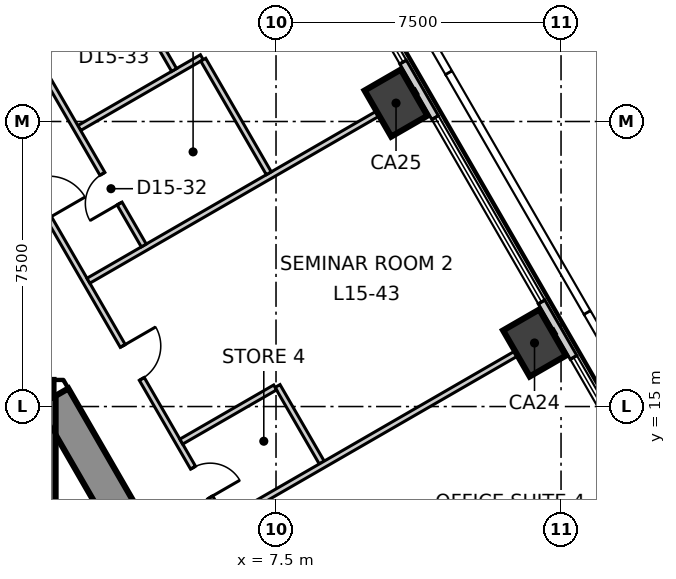
"""IFC4 building model, lengths in metres.
Left out: names, types, materials, properties, quantities, classifications, styles, units other than length and angle.
Written with IfcOpenShell. Run it as: python <this file> out.ifc"""

import sys

from ifc_helpers import new_model, si_unit, direction, frame, frame_2d, origin, origin_2d, place, context, subcontext, project, spatial, polyline, rectangle, outline, extrude, element, fill, save


model = new_model("IFC4")
c1 = context("Model", 3, precision=1e-05, world=origin(), true_north=direction((0.0, 1.0)))
c2 = subcontext(c1, "Body", "Model", "MODEL_VIEW")
j1 = project(units=[si_unit("LENGTHUNIT", "METRE"), si_unit("PLANEANGLEUNIT", "RADIAN")], contexts=[c1])
p1 = place(None, origin())
s1 = spatial("IfcSite", under=j1, at=p1, CompositionType="ELEMENT")
p2 = place(p1, origin())
s2 = spatial("IfcBuilding", under=s1, at=p2, CompositionType="ELEMENT")
p3 = place(p2, frame((0.0, 0.0, 71.3)))
s3 = spatial("IfcBuildingStorey", under=s2, at=p3, CompositionType="ELEMENT", Elevation=71.3)
p4 = place(p3, frame((1.645, 15.25, -0.3), z_axis=(0.0, 0.0, 1.0), x_axis=(-1.0, 0.0, 0.0)))
e1 = element("IfcWall", 1, at=p4, inside=s3, PredefinedType="SHEAR", context=c2, shape_type="SweptSolid", body=[
    extrude(outline(polyline([(-0.26, -0.45), (1.645, -0.45), (3.55, -0.45), (3.031, 0.45), (1.645, 0.45), (0.259, 0.45), (-0.26, -0.45)])), origin(), (0.0, 0.0, 1.0), 4.0),
])
p5 = place(p4, frame((0.945, 0.0, 0.3)))
e2 = element("IfcOpeningElement", 2, at=p5, cuts=e1, PredefinedType="OPENING", context=c2, shape_type="SweptSolid", body=[
    extrude(rectangle(XDim=1.4, YDim=2.1, at=frame_2d((0.7, 1.05))), frame((0.0, 0.46, 0.0), z_axis=(0.0, -1.0, 0.0), x_axis=(1.0, 0.0, 0.0)), (0.0, 0.0, 1.0), 0.92),
])
p6 = place(p3, frame((14.03, -6.2, -0.3), z_axis=(0.0, 0.0, 1.0), x_axis=(-0.500026485275, 0.866010111964, 0.0)))
e3 = element("IfcWall", 3, at=p6, inside=s3, PredefinedType="SHEAR", context=c2, shape_type="SweptSolid", body=[
    extrude(outline(polyline([(-0.26, -0.449), (1.685, -0.449), (3.63, -0.449), (5.576, -0.449), (7.521, -0.449), (9.466, -0.449), (11.411, -0.449), (13.357, -0.449), (15.302, -0.449), (17.247, -0.45), (19.192, -0.45), (21.138, -0.45), (23.083, -0.45), (25.028, -0.45), (24.509, 0.449), (22.644, 0.449), (20.778, 0.449), (18.913, 0.449), (17.048, 0.449), (15.182, 0.449), (13.317, 0.449), (11.452, 0.449), (9.587, 0.449), (7.721, 0.45), (5.856, 0.45), (3.991, 0.45), (2.125, 0.45), (0.26, 0.45), (-0.26, -0.449)])), origin(), (0.0, 0.0, 1.0), 4.0),
])
p7 = place(p6, frame((11.484, 0.0, 0.3)))
e4 = element("IfcOpeningElement", 4, at=p7, cuts=e3, PredefinedType="OPENING", context=c2, shape_type="SweptSolid", body=[
    extrude(rectangle(XDim=1.8, YDim=2.1, at=frame_2d((0.9, 1.05))), frame((0.0, 0.46, 0.0), z_axis=(0.0, -1.0, 0.0), x_axis=(1.0, 0.0, 0.0)), (0.0, 0.0, 1.0), 0.92),
])
p8 = place(p6, frame((4.892, 0.0, 0.3)))
e5 = element("IfcOpeningElement", 5, at=p8, cuts=e3, PredefinedType="OPENING", context=c2, shape_type="SweptSolid", body=[
    extrude(rectangle(XDim=0.9, YDim=2.1, at=frame_2d((0.45, 1.05))), frame((0.0, 0.46, 0.0), z_axis=(0.0, -1.0, 0.0), x_axis=(1.0, 0.0, 0.0)), (0.0, 0.0, 1.0), 0.92),
])
p9 = place(p6, frame((18.976, 0.0, 0.3)))
e6 = element("IfcOpeningElement", 6, at=p9, cuts=e3, PredefinedType="OPENING", context=c2, shape_type="SweptSolid", body=[
    extrude(rectangle(XDim=0.9, YDim=2.1, at=frame_2d((0.45, 1.05))), frame((0.0, 0.46, 0.0), z_axis=(0.0, -1.0, 0.0), x_axis=(1.0, 0.0, 0.0)), (0.0, 0.0, 1.0), 0.92),
])
for number, where, z_axis, x_axis in (
    (7, (14.302, 16.672, -0.3), (0.0, 0.0, 1.0), (-0.5, 0.866, 0.0)),
    (8, (10.658, 22.984, -0.3), (0.0, 0.0, 1.0), (-0.5, 0.866, 0.0)),
):
    element("IfcColumn", number, at=place(p3, frame(where, z_axis=z_axis, x_axis=x_axis)), inside=s3, PredefinedType="COLUMN", context=c2, shape_type="SweptSolid", body=[
        extrude(rectangle(XDim=1.4, YDim=1.1, at=origin_2d()), origin(), (0.0, 0.0, 1.0), 4.0),
    ])
p10 = place(p3, frame((33.779, -15.662, 0.0), z_axis=(0.0, 0.0, 1.0), x_axis=(-0.500000131003, 0.86602532815, 0.0)))
e9 = element("IfcWall", 9, at=p10, inside=s3, PredefinedType="ELEMENTEDWALL", context=c2, shape_type="SweptSolid", body=[
    extrude(rectangle(XDim=60.886, YDim=0.2, at=frame_2d((30.443, 0.0))), origin(), (0.0, 0.0, 1.0), 3.7),
])
p11 = place(p10, frame((2.147, 0.0, 0.9)))
e10 = element("IfcOpeningElement", 10, at=p11, cuts=e9, PredefinedType="OPENING", context=c2, shape_type="SweptSolid", body=[
    extrude(rectangle(XDim=5.6, YDim=2.5, at=frame_2d((2.8, 1.25))), frame((0.0, 0.11, 0.0), z_axis=(0.0, -1.0, 0.0), x_axis=(1.0, 0.0, 0.0)), (0.0, 0.0, 1.0), 0.22),
])
p12 = place(p10, frame((9.434, 0.0, 0.9)))
e11 = element("IfcOpeningElement", 11, at=p12, cuts=e9, PredefinedType="OPENING", context=c2, shape_type="SweptSolid", body=[
    extrude(rectangle(XDim=5.6, YDim=2.5, at=frame_2d((2.8, 1.25))), frame((0.0, 0.11, 0.0), z_axis=(0.0, -1.0, 0.0), x_axis=(1.0, 0.0, 0.0)), (0.0, 0.0, 1.0), 0.22),
])
p13 = place(p10, frame((16.722, 0.0, 0.9)))
e12 = element("IfcOpeningElement", 12, at=p13, cuts=e9, PredefinedType="OPENING", context=c2, shape_type="SweptSolid", body=[
    extrude(rectangle(XDim=5.6, YDim=2.5, at=frame_2d((2.8, 1.25))), frame((0.0, 0.11, 0.0), z_axis=(0.0, -1.0, 0.0), x_axis=(1.0, 0.0, 0.0)), (0.0, 0.0, 1.0), 0.22),
])
p14 = place(p10, frame((24.009, 0.0, 0.9)))
e13 = element("IfcOpeningElement", 13, at=p14, cuts=e9, PredefinedType="OPENING", context=c2, shape_type="SweptSolid", body=[
    extrude(rectangle(XDim=5.6, YDim=2.5, at=frame_2d((2.8, 1.25))), frame((0.0, 0.11, 0.0), z_axis=(0.0, -1.0, 0.0), x_axis=(1.0, 0.0, 0.0)), (0.0, 0.0, 1.0), 0.22),
])
p15 = place(p10, frame((31.297, 0.0, 0.9)))
e14 = element("IfcOpeningElement", 14, at=p15, cuts=e9, PredefinedType="OPENING", context=c2, shape_type="SweptSolid", body=[
    extrude(rectangle(XDim=5.6, YDim=2.5, at=frame_2d((2.8, 1.25))), frame((0.0, 0.11, 0.0), z_axis=(0.0, -1.0, 0.0), x_axis=(1.0, 0.0, 0.0)), (0.0, 0.0, 1.0), 0.22),
])
p16 = place(p10, frame((38.584, 0.0, 0.9)))
e15 = element("IfcOpeningElement", 15, at=p16, cuts=e9, PredefinedType="OPENING", context=c2, shape_type="SweptSolid", body=[
    extrude(rectangle(XDim=5.6, YDim=2.5, at=frame_2d((2.8, 1.25))), frame((0.0, 0.11, 0.0), z_axis=(0.0, -1.0, 0.0), x_axis=(1.0, 0.0, 0.0)), (0.0, 0.0, 1.0), 0.22),
])
p17 = place(p10, frame((45.872, 0.0, 0.9)))
e16 = element("IfcOpeningElement", 16, at=p17, cuts=e9, PredefinedType="OPENING", context=c2, shape_type="SweptSolid", body=[
    extrude(rectangle(XDim=5.6, YDim=2.5, at=frame_2d((2.8, 1.25))), frame((0.0, 0.11, 0.0), z_axis=(0.0, -1.0, 0.0), x_axis=(1.0, 0.0, 0.0)), (0.0, 0.0, 1.0), 0.22),
])
p18 = place(p10, frame((53.16, 0.0, 0.9)))
e17 = element("IfcOpeningElement", 17, at=p18, cuts=e9, PredefinedType="OPENING", context=c2, shape_type="SweptSolid", body=[
    extrude(rectangle(XDim=5.6, YDim=2.5, at=frame_2d((2.8, 1.25))), frame((0.0, 0.11, 0.0), z_axis=(0.0, -1.0, 0.0), x_axis=(1.0, 0.0, 0.0)), (0.0, 0.0, 1.0), 0.22),
])
p19 = place(p3, frame((0.075, 22.47, 0.0), z_axis=(0.0, 0.0, 1.0), x_axis=(0.500002280369, -0.866024087209, 0.0)))
e18 = element("IfcWall", 18, at=p19, inside=s3, PredefinedType="PARTITIONING", context=c2, shape_type="SweptSolid", body=[
    extrude(rectangle(XDim=38.844, YDim=0.15, at=frame_2d((19.422, 0.0))), origin(), (0.0, 0.0, 1.0), 3.7),
])
p20 = place(p19, frame((35.944, 0.0, 0.0)))
e19 = element("IfcOpeningElement", 19, at=p20, cuts=e18, PredefinedType="OPENING", context=c2, shape_type="SweptSolid", body=[
    extrude(rectangle(XDim=1.1, YDim=2.1, at=frame_2d((0.55, 1.05))), frame((0.0, 0.085, 0.0), z_axis=(0.0, -1.0, 0.0), x_axis=(1.0, 0.0, 0.0)), (0.0, 0.0, 1.0), 0.17),
])
p21 = place(p19, frame((29.848, 0.0, 0.0)))
e20 = element("IfcOpeningElement", 20, at=p21, cuts=e18, PredefinedType="OPENING", context=c2, shape_type="SweptSolid", body=[
    extrude(rectangle(XDim=1.0, YDim=2.1, at=frame_2d((0.5, 1.05))), frame((0.0, 0.085, 0.0), z_axis=(0.0, -1.0, 0.0), x_axis=(1.0, 0.0, 0.0)), (0.0, 0.0, 1.0), 0.17),
])
p22 = place(p19, frame((14.46, 0.0, 0.0)))
e21 = element("IfcOpeningElement", 21, at=p22, cuts=e18, PredefinedType="OPENING", context=c2, shape_type="SweptSolid", body=[
    extrude(rectangle(XDim=1.1, YDim=2.1, at=frame_2d((0.55, 1.05))), frame((0.0, 0.085, 0.0), z_axis=(0.0, -1.0, 0.0), x_axis=(1.0, 0.0, 0.0)), (0.0, 0.0, 1.0), 0.17),
])
p23 = place(p19, frame((24.66, 0.0, 0.0)))
e22 = element("IfcOpeningElement", 22, at=p23, cuts=e18, PredefinedType="OPENING", context=c2, shape_type="SweptSolid", body=[
    extrude(rectangle(XDim=0.9, YDim=2.1, at=frame_2d((0.45, 1.05))), frame((0.0, 0.085, 0.0), z_axis=(0.0, -1.0, 0.0), x_axis=(1.0, 0.0, 0.0)), (0.0, 0.0, 1.0), 0.17),
])
p24 = place(p19, frame((21.46, 0.0, 0.0)))
e23 = element("IfcOpeningElement", 23, at=p24, cuts=e18, PredefinedType="OPENING", context=c2, shape_type="SweptSolid", body=[
    extrude(rectangle(XDim=0.9, YDim=2.1, at=frame_2d((0.45, 1.05))), frame((0.0, 0.085, 0.0), z_axis=(0.0, -1.0, 0.0), x_axis=(1.0, 0.0, 0.0)), (0.0, 0.0, 1.0), 0.17),
])
p25 = place(p19, frame((18.66, 0.0, 0.0)))
e24 = element("IfcOpeningElement", 24, at=p25, cuts=e18, PredefinedType="OPENING", context=c2, shape_type="SweptSolid", body=[
    extrude(rectangle(XDim=1.0, YDim=2.1, at=frame_2d((0.5, 1.05))), frame((0.0, 0.085, 0.0), z_axis=(0.0, -1.0, 0.0), x_axis=(1.0, 0.0, 0.0)), (0.0, 0.0, 1.0), 0.17),
])
p26 = place(p19, frame((6.785, 0.0, 0.0)))
e25 = element("IfcOpeningElement", 25, at=p26, cuts=e18, PredefinedType="OPENING", context=c2, shape_type="SweptSolid", body=[
    extrude(rectangle(XDim=1.0, YDim=2.1, at=frame_2d((0.5, 1.05))), frame((0.0, 0.085, 0.0), z_axis=(0.0, -1.0, 0.0), x_axis=(1.0, 0.0, 0.0)), (0.0, 0.0, 1.0), 0.17),
])
p27 = place(p19, frame((10.485, 0.0, 0.0)))
e26 = element("IfcOpeningElement", 26, at=p27, cuts=e18, PredefinedType="OPENING", context=c2, shape_type="SweptSolid", body=[
    extrude(rectangle(XDim=0.9, YDim=2.1, at=frame_2d((0.45, 1.05))), frame((0.0, 0.085, 0.0), z_axis=(0.0, -1.0, 0.0), x_axis=(1.0, 0.0, 0.0)), (0.0, 0.0, 1.0), 0.17),
])
p28 = place(p19, frame((1.796, 0.0, 0.0)))
e27 = element("IfcOpeningElement", 27, at=p28, cuts=e18, PredefinedType="OPENING", context=c2, shape_type="SweptSolid", body=[
    extrude(rectangle(XDim=1.1, YDim=2.1, at=frame_2d((0.55, 1.05))), frame((0.0, 0.085, 0.0), z_axis=(0.0, -1.0, 0.0), x_axis=(1.0, 0.0, 0.0)), (0.0, 0.0, 1.0), 0.17),
])
p29 = place(p3, frame((2.563, 18.31, 0.0), z_axis=(0.0, 0.0, 1.0), x_axis=(0.866018758693, 0.500011509459, 0.0)))
e28 = element("IfcWall", 28, at=p29, inside=s3, PredefinedType="PARTITIONING", context=c2, shape_type="SweptSolid", body=[
    extrude(rectangle(XDim=9.968, YDim=0.15, at=frame_2d((4.984, 0.0))), origin(), (0.0, 0.0, 1.0), 3.7),
])
p30 = place(p3, frame((7.54, 15.54, 0.0), z_axis=(0.0, 0.0, 1.0), x_axis=(0.499988999718, -0.866031754707, 0.0)))
e29 = element("IfcWall", 29, at=p30, inside=s3, PredefinedType="PARTITIONING", context=c2, shape_type="SweptSolid", body=[
    extrude(rectangle(XDim=2.326, YDim=0.15, at=frame_2d((1.163, 0.0))), origin(), (0.0, 0.0, 1.0), 3.7),
])
p31 = place(p3, frame((5.007, 14.077, 0.0), z_axis=(0.0, 0.0, 1.0), x_axis=(0.866090043625, 0.499888023795, 0.0)))
e30 = element("IfcWall", 30, at=p31, inside=s3, PredefinedType="PARTITIONING", context=c2, shape_type="SweptSolid", body=[
    extrude(rectangle(XDim=2.851, YDim=0.15, at=frame_2d((1.425, 0.0))), origin(), (0.0, 0.0, 1.0), 3.7),
])
p32 = place(p3, frame((6.207, 11.999, 0.0), z_axis=(0.0, 0.0, 1.0), x_axis=(0.866061182393, 0.499938024511, 0.0)))
e31 = element("IfcWall", 31, at=p32, inside=s3, PredefinedType="PARTITIONING", context=c2, shape_type="SweptSolid", body=[
    extrude(rectangle(XDim=9.967, YDim=0.15, at=frame_2d((4.983, 0.0))), origin(), (0.0, 0.0, 1.0), 3.7),
])
p33 = place(p3, frame((2.322, 22.328, 0.0), z_axis=(0.0, 0.0, 1.0), x_axis=(0.865971665278, 0.500093066274, 0.0)))
e32 = element("IfcWall", 32, at=p33, inside=s3, PredefinedType="PARTITIONING", context=c2, shape_type="SweptSolid", body=[
    extrude(rectangle(XDim=3.725, YDim=0.15, at=frame_2d((1.863, 0.0))), origin(), (0.0, 0.0, 1.0), 3.7),
])
p34 = place(p3, frame((3.755, 25.696, 0.0), z_axis=(0.0, 0.0, 1.0), x_axis=(0.500302479123, -0.865850696935, 0.0)))
e33 = element("IfcWall", 33, at=p34, inside=s3, PredefinedType="PARTITIONING", context=c2, shape_type="SweptSolid", body=[
    extrude(rectangle(XDim=2.125, YDim=0.15, at=frame_2d((1.062, 0.0))), origin(), (0.0, 0.0, 1.0), 3.7),
])
p35 = place(p3, frame((1.157, 24.196, 0.0), z_axis=(0.0, 0.0, 1.0), x_axis=(0.866098016745, 0.499874209568, 0.0)))
e34 = element("IfcWall", 34, at=p35, inside=s3, PredefinedType="PARTITIONING", context=c2, shape_type="SweptSolid", body=[
    extrude(rectangle(XDim=2.925, YDim=0.15, at=frame_2d((1.462, 0.0))), origin(), (0.0, 0.0, 1.0), 3.7),
])
p36 = place(p35, frame((1.05, 0.0, 0.0)))
e35 = element("IfcOpeningElement", 35, at=p36, cuts=e34, PredefinedType="OPENING", context=c2, shape_type="SweptSolid", body=[
    extrude(rectangle(XDim=0.9, YDim=2.1, at=frame_2d((0.45, 1.05))), frame((0.0, 0.085, 0.0), z_axis=(0.0, -1.0, 0.0), x_axis=(1.0, 0.0, 0.0)), (0.0, 0.0, 1.0), 0.17),
])
p37 = place(p3, frame((1.195, 24.131, 0.0), z_axis=(0.0, 0.0, 1.0), x_axis=(0.499991765245, -0.86603015807, 0.0)))
e36 = element("IfcWall", 36, at=p37, inside=s3, PredefinedType="PARTITIONING", context=c2, shape_type="SweptSolid", body=[
    extrude(rectangle(XDim=5.65, YDim=0.15, at=frame_2d((2.825, 0.0))), origin(), (0.0, 0.0, 1.0), 3.7),
])
p38 = place(p37, frame((3.475, 0.0, 0.0)))
e37 = element("IfcOpeningElement", 37, at=p38, cuts=e36, PredefinedType="OPENING", context=c2, shape_type="SweptSolid", body=[
    extrude(rectangle(XDim=0.9, YDim=2.1, at=frame_2d((0.45, 1.05))), frame((0.0, 0.085, 0.0), z_axis=(0.0, -1.0, 0.0), x_axis=(1.0, 0.0, 0.0)), (0.0, 0.0, 1.0), 0.17),
])
p39 = place(p3, frame((5.585, 24.126, 0.0), z_axis=(0.0, 0.0, 1.0), x_axis=(0.49998991961, -0.866031223622, 0.0)))
e38 = element("IfcWall", 38, at=p39, inside=s3, PredefinedType="PARTITIONING", context=c2, shape_type="SweptSolid", body=[
    extrude(rectangle(XDim=3.45, YDim=0.15, at=frame_2d((1.725, 0.0))), origin(), (0.0, 0.0, 1.0), 3.7),
])
p40 = place(p3, frame((1.6, 6.615, 0.0), z_axis=(0.0, 0.0, 1.0), x_axis=(0.0, 1.0, 0.0)))
e39 = element("IfcWall", 39, at=p40, inside=s3, PredefinedType="SOLIDWALL", context=c2, shape_type="SweptSolid", body=[
    extrude(rectangle(XDim=8.615, YDim=0.2, at=frame_2d((4.308, 0.0))), origin(), (0.0, 0.0, 1.0), 3.7),
])
p41 = place(p15, origin())
e40 = element("IfcWindow", 40, at=p41, inside=s3, PartitioningType="SINGLE_PANEL", PredefinedType="WINDOW", context=c2, shape_type="SweptSolid", body=[
    extrude(rectangle(XDim=5.6, YDim=2.5, at=frame_2d((2.8, 1.25))), frame((0.0, 0.03, 0.0), z_axis=(0.0, -1.0, 0.0), x_axis=(1.0, 0.0, 0.0)), (0.0, 0.0, 1.0), 0.06),
])
fill(e14, e40)
p42 = place(p16, origin())
e41 = element("IfcWindow", 41, at=p42, inside=s3, PartitioningType="SINGLE_PANEL", PredefinedType="WINDOW", context=c2, shape_type="SweptSolid", body=[
    extrude(rectangle(XDim=5.6, YDim=2.5, at=frame_2d((2.8, 1.25))), frame((0.0, 0.03, 0.0), z_axis=(0.0, -1.0, 0.0), x_axis=(1.0, 0.0, 0.0)), (0.0, 0.0, 1.0), 0.06),
])
fill(e15, e41)
p43 = place(p17, origin())
e42 = element("IfcWindow", 42, at=p43, inside=s3, PartitioningType="SINGLE_PANEL", PredefinedType="WINDOW", context=c2, shape_type="SweptSolid", body=[
    extrude(rectangle(XDim=5.6, YDim=2.5, at=frame_2d((2.8, 1.25))), frame((0.0, 0.03, 0.0), z_axis=(0.0, -1.0, 0.0), x_axis=(1.0, 0.0, 0.0)), (0.0, 0.0, 1.0), 0.06),
])
fill(e16, e42)
p44 = place(p26, origin())
e43 = element("IfcDoor", 43, at=p44, inside=s3, OperationType="SINGLE_SWING_RIGHT", PredefinedType="DOOR", context=c2, shape_type="SweptSolid", body=[
    extrude(rectangle(XDim=1.0, YDim=2.1, at=frame_2d((0.5, 1.05))), frame((0.0, 0.025, 0.0), z_axis=(0.0, -1.0, 0.0), x_axis=(1.0, 0.0, 0.0)), (0.0, 0.0, 1.0), 0.05),
])
fill(e25, e43)
p45 = place(p27, origin())
e44 = element("IfcDoor", 44, at=p45, inside=s3, OperationType="SINGLE_SWING_LEFT", PredefinedType="DOOR", context=c2, shape_type="SweptSolid", body=[
    extrude(rectangle(XDim=0.9, YDim=2.1, at=frame_2d((0.45, 1.05))), frame((0.0, 0.025, 0.0), z_axis=(0.0, -1.0, 0.0), x_axis=(1.0, 0.0, 0.0)), (0.0, 0.0, 1.0), 0.05),
])
fill(e26, e44)
p46 = place(p38, origin())
e45 = element("IfcDoor", 45, at=p46, inside=s3, OperationType="SINGLE_SWING_RIGHT", PredefinedType="DOOR", context=c2, shape_type="SweptSolid", body=[
    extrude(rectangle(XDim=0.9, YDim=2.1, at=frame_2d((0.45, 1.05))), frame((0.0, 0.025, 0.0), z_axis=(0.0, -1.0, 0.0), x_axis=(1.0, 0.0, 0.0)), (0.0, 0.0, 1.0), 0.05),
])
fill(e37, e45)
save(model, sys.argv[1])
